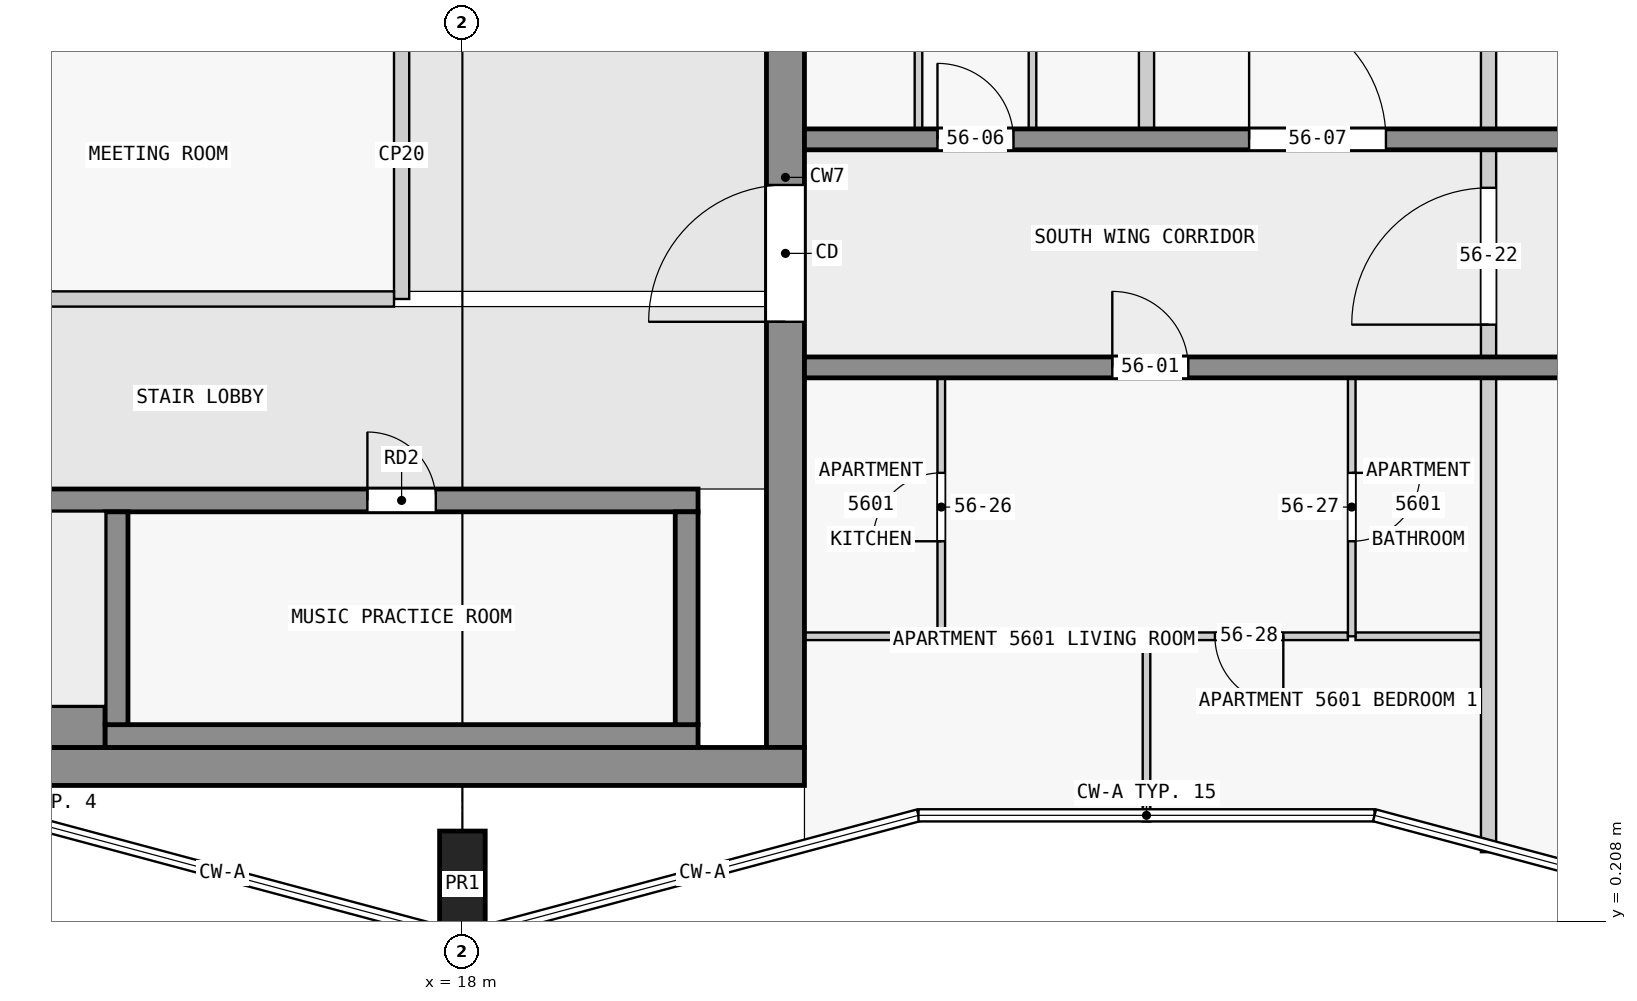
"""IFC4 building model, lengths in metres.
Left out: names, types, materials, properties, quantities, classifications, styles, units other than length and angle.
Written with IfcOpenShell. Run it as: python <this file> out.ifc"""

import sys

from ifc_helpers import new_model, si_unit, direction, frame, frame_2d, origin, origin_2d, place, context, subcontext, project, spatial, rectangle, extrude, element, fill, save


model = new_model("IFC4")
c1 = context("Model", 3, precision=1e-05, world=origin(), true_north=direction((0.0, 1.0)))
c2 = subcontext(c1, "Body", "Model", "MODEL_VIEW")
j1 = project(units=[si_unit("LENGTHUNIT", "METRE"), si_unit("PLANEANGLEUNIT", "RADIAN")], contexts=[c1])
p1 = place(None, origin())
s1 = spatial("IfcSite", under=j1, at=p1, CompositionType="ELEMENT")
p2 = place(p1, origin())
s2 = spatial("IfcBuilding", under=s1, at=p2, CompositionType="ELEMENT")
p3 = place(p2, frame((0.0, 0.0, 215.4)))
s3 = spatial("IfcBuildingStorey", under=s2, at=p3, CompositionType="ELEMENT", Elevation=215.4)
p4 = place(p3, frame((18.0, 0.7, 0.0), z_axis=(0.0, 0.0, 1.0), x_axis=(1.0, 0.0, 0.0)))
e1 = element("IfcColumn", 1, at=p4, inside=s3, PredefinedType="COLUMN", context=c2, shape_type="SweptSolid", body=[
    extrude(rectangle(XDim=0.6, YDim=1.4, at=origin_2d()), origin(), (0.0, 0.0, 1.0), 3.5),
])
p5 = place(p3, frame((1.8, 2.25, 0.0), z_axis=(0.0, 0.0, 1.0), x_axis=(1.0, 0.0, 0.0)))
e2 = element("IfcWall", 2, at=p5, inside=s3, PredefinedType="SHEAR", context=c2, shape_type="SweptSolid", body=[
    extrude(rectangle(XDim=20.7, YDim=0.5, at=frame_2d((10.35, 0.0))), origin(), (0.0, 0.0, 1.0), 3.25),
])
p6 = place(p3, frame((22.25, 2.5, 0.0), z_axis=(0.0, 0.0, 1.0), x_axis=(0.0, 1.0, 0.0)))
e3 = element("IfcWall", 3, at=p6, inside=s3, PredefinedType="SHEAR", context=c2, shape_type="SweptSolid", body=[
    extrude(rectangle(XDim=15.0, YDim=0.5, at=frame_2d((7.5, 0.0))), origin(), (0.0, 0.0, 1.0), 3.25),
])
p7 = place(p6, frame((5.6, 0.0, 0.0)))
e4 = element("IfcOpeningElement", 4, at=p7, cuts=e3, PredefinedType="OPENING", context=c2, shape_type="SweptSolid", body=[
    extrude(rectangle(XDim=1.8, YDim=2.1, at=frame_2d((0.9, 1.05))), frame((0.0, 0.26, 0.0), z_axis=(0.0, -1.0, 0.0), x_axis=(1.0, 0.0, 0.0)), (0.0, 0.0, 1.0), 0.52),
])
p8 = place(p3, frame((6.9, 2.775, 0.0), z_axis=(0.0, 0.0, 1.0), x_axis=(1.0, 0.0, 0.0)))
e5 = element("IfcWall", 5, at=p8, inside=s3, PredefinedType="SHEAR", context=c2, shape_type="SweptSolid", body=[
    extrude(rectangle(XDim=6.4, YDim=0.55, at=frame_2d((3.2, 0.0))), origin(), (0.0, 0.0, 1.0), 3.25),
])
p9 = place(p3, frame((13.3, 2.65, 0.0), z_axis=(0.0, 0.0, 1.0), x_axis=(1.0, 0.0, 0.0)))
e6 = element("IfcWall", 6, at=p9, inside=s3, PredefinedType="SHEAR", context=c2, shape_type="SweptSolid", body=[
    extrude(rectangle(XDim=7.8, YDim=0.3, at=frame_2d((3.9, 0.0))), origin(), (0.0, 0.0, 1.0), 3.25),
])
for number, where, z_axis, x_axis in (
    (7, (13.45, 2.8, 0.0), (0.0, 0.0, 1.0), (0.0, 1.0, 0.0)),
    (8, (20.95, 2.8, 0.0), (0.0, 0.0, 1.0), (0.0, 1.0, 0.0)),
):
    element("IfcWall", number, at=place(p3, frame(where, z_axis=z_axis, x_axis=x_axis)), inside=s3, PredefinedType="SHEAR", context=c2, shape_type="SweptSolid", body=[
        extrude(rectangle(XDim=2.8, YDim=0.3, at=frame_2d((1.4, 0.0))), origin(), (0.0, 0.0, 1.0), 3.25),
    ])
p10 = place(p3, frame((2.3, 5.75, 0.0), z_axis=(0.0, 0.0, 1.0), x_axis=(1.0, 0.0, 0.0)))
e9 = element("IfcWall", 9, at=p10, inside=s3, PredefinedType="SHEAR", context=c2, shape_type="SweptSolid", body=[
    extrude(rectangle(XDim=18.8, YDim=0.3, at=frame_2d((9.4, 0.0))), origin(), (0.0, 0.0, 1.0), 3.25),
])
p11 = place(p10, frame((4.65, 0.0, 0.0)))
e10 = element("IfcOpeningElement", 10, at=p11, cuts=e9, PredefinedType="OPENING", context=c2, shape_type="SweptSolid", body=[
    extrude(rectangle(XDim=1.1, YDim=2.1, at=frame_2d((0.55, 1.05))), frame((0.0, 0.16, 0.0), z_axis=(0.0, -1.0, 0.0), x_axis=(1.0, 0.0, 0.0)), (0.0, 0.0, 1.0), 0.32),
])
p12 = place(p10, frame((0.45, 0.0, 0.0)))
e11 = element("IfcOpeningElement", 11, at=p12, cuts=e9, PredefinedType="OPENING", context=c2, shape_type="SweptSolid", body=[
    extrude(rectangle(XDim=1.1, YDim=2.1, at=frame_2d((0.55, 1.05))), frame((0.0, 0.16, 0.0), z_axis=(0.0, -1.0, 0.0), x_axis=(1.0, 0.0, 0.0)), (0.0, 0.0, 1.0), 0.32),
])
p13 = place(p10, frame((2.75, 0.0, 0.0)))
e12 = element("IfcOpeningElement", 12, at=p13, cuts=e9, PredefinedType="OPENING", context=c2, shape_type="SweptSolid", body=[
    extrude(rectangle(XDim=1.1, YDim=2.1, at=frame_2d((0.55, 1.05))), frame((0.0, 0.16, 0.0), z_axis=(0.0, -1.0, 0.0), x_axis=(1.0, 0.0, 0.0)), (0.0, 0.0, 1.0), 0.32),
])
p14 = place(p10, frame((14.45, 0.0, 0.0)))
e13 = element("IfcOpeningElement", 13, at=p14, cuts=e9, PredefinedType="OPENING", context=c2, shape_type="SweptSolid", body=[
    extrude(rectangle(XDim=0.9, YDim=2.1, at=frame_2d((0.45, 1.05))), frame((0.0, 0.16, 0.0), z_axis=(0.0, -1.0, 0.0), x_axis=(1.0, 0.0, 0.0)), (0.0, 0.0, 1.0), 0.32),
])
p15 = place(p3, frame((22.5, 7.5, 0.0), z_axis=(0.0, 0.0, 1.0), x_axis=(1.0, 0.0, 0.0)))
e14 = element("IfcWall", 14, at=p15, inside=s3, PredefinedType="SHEAR", context=c2, shape_type="SweptSolid", body=[
    extrude(rectangle(XDim=22.5, YDim=0.275, at=frame_2d((11.25, 0.0))), origin(), (0.0, 0.0, 1.0), 3.25),
])
p16 = place(p15, frame((4.05, 0.0, 0.0)))
e15 = element("IfcOpeningElement", 15, at=p16, cuts=e14, PredefinedType="OPENING", context=c2, shape_type="SweptSolid", body=[
    extrude(rectangle(XDim=1.0, YDim=2.1, at=frame_2d((0.5, 1.05))), frame((0.0, 0.147, 0.0), z_axis=(0.0, -1.0, 0.0), x_axis=(1.0, 0.0, 0.0)), (0.0, 0.0, 1.0), 0.295),
])
p17 = place(p15, frame((10.75, 0.0, 0.0)))
e16 = element("IfcOpeningElement", 16, at=p17, cuts=e14, PredefinedType="OPENING", context=c2, shape_type="SweptSolid", body=[
    extrude(rectangle(XDim=1.0, YDim=2.1, at=frame_2d((0.5, 1.05))), frame((0.0, 0.147, 0.0), z_axis=(0.0, -1.0, 0.0), x_axis=(1.0, 0.0, 0.0)), (0.0, 0.0, 1.0), 0.295),
])
p18 = place(p15, frame((15.25, 0.0, 0.0)))
e17 = element("IfcOpeningElement", 17, at=p18, cuts=e14, PredefinedType="OPENING", context=c2, shape_type="SweptSolid", body=[
    extrude(rectangle(XDim=1.0, YDim=2.1, at=frame_2d((0.5, 1.05))), frame((0.0, 0.147, 0.0), z_axis=(0.0, -1.0, 0.0), x_axis=(1.0, 0.0, 0.0)), (0.0, 0.0, 1.0), 0.295),
])
p19 = place(p15, frame((18.75, 0.0, 0.0)))
e18 = element("IfcOpeningElement", 18, at=p19, cuts=e14, PredefinedType="OPENING", context=c2, shape_type="SweptSolid", body=[
    extrude(rectangle(XDim=0.9, YDim=2.1, at=frame_2d((0.45, 1.05))), frame((0.0, 0.147, 0.0), z_axis=(0.0, -1.0, 0.0), x_axis=(1.0, 0.0, 0.0)), (0.0, 0.0, 1.0), 0.295),
])
p20 = place(p15, frame((20.95, 0.0, 0.0)))
e19 = element("IfcOpeningElement", 19, at=p20, cuts=e14, PredefinedType="OPENING", context=c2, shape_type="SweptSolid", body=[
    extrude(rectangle(XDim=1.0, YDim=2.1, at=frame_2d((0.5, 1.05))), frame((0.0, 0.147, 0.0), z_axis=(0.0, -1.0, 0.0), x_axis=(1.0, 0.0, 0.0)), (0.0, 0.0, 1.0), 0.295),
])
p21 = place(p3, frame((22.5, 10.5, 0.0), z_axis=(0.0, 0.0, 1.0), x_axis=(1.0, 0.0, 0.0)))
e20 = element("IfcWall", 20, at=p21, inside=s3, PredefinedType="SHEAR", context=c2, shape_type="SweptSolid", body=[
    extrude(rectangle(XDim=22.5, YDim=0.275, at=frame_2d((11.25, 0.0))), origin(), (0.0, 0.0, 1.0), 3.25),
])
p22 = place(p21, frame((1.75, 0.0, 0.0)))
e21 = element("IfcOpeningElement", 21, at=p22, cuts=e20, PredefinedType="OPENING", context=c2, shape_type="SweptSolid", body=[
    extrude(rectangle(XDim=1.0, YDim=2.1, at=frame_2d((0.5, 1.05))), frame((0.0, 0.147, 0.0), z_axis=(0.0, -1.0, 0.0), x_axis=(1.0, 0.0, 0.0)), (0.0, 0.0, 1.0), 0.295),
])
p23 = place(p21, frame((5.85, 0.0, 0.0)))
e22 = element("IfcOpeningElement", 22, at=p23, cuts=e20, PredefinedType="OPENING", context=c2, shape_type="SweptSolid", body=[
    extrude(rectangle(XDim=1.8, YDim=2.1, at=frame_2d((0.9, 1.05))), frame((0.0, 0.147, 0.0), z_axis=(0.0, -1.0, 0.0), x_axis=(1.0, 0.0, 0.0)), (0.0, 0.0, 1.0), 0.295),
])
p24 = place(p21, frame((10.75, 0.0, 0.0)))
e23 = element("IfcOpeningElement", 23, at=p24, cuts=e20, PredefinedType="OPENING", context=c2, shape_type="SweptSolid", body=[
    extrude(rectangle(XDim=1.0, YDim=2.1, at=frame_2d((0.5, 1.05))), frame((0.0, 0.147, 0.0), z_axis=(0.0, -1.0, 0.0), x_axis=(1.0, 0.0, 0.0)), (0.0, 0.0, 1.0), 0.295),
])
p25 = place(p21, frame((16.85, 0.0, 0.0)))
e24 = element("IfcOpeningElement", 24, at=p25, cuts=e20, PredefinedType="OPENING", context=c2, shape_type="SweptSolid", body=[
    extrude(rectangle(XDim=1.0, YDim=2.1, at=frame_2d((0.5, 1.05))), frame((0.0, 0.147, 0.0), z_axis=(0.0, -1.0, 0.0), x_axis=(1.0, 0.0, 0.0)), (0.0, 0.0, 1.0), 0.295),
])
p26 = place(p3, frame((10.9, 8.4, 0.0), z_axis=(0.0, 0.0, 1.0), x_axis=(1.0, 0.0, 0.0)))
e25 = element("IfcWall", 25, at=p26, inside=s3, PredefinedType="PARTITIONING", context=c2, shape_type="SweptSolid", body=[
    extrude(rectangle(XDim=6.2, YDim=0.2, at=frame_2d((3.1, 0.0))), origin(), (0.0, 0.0, 1.0), 3.25),
])
p27 = place(p3, frame((17.2, 8.4, 0.0), z_axis=(0.0, 0.0, 1.0), x_axis=(0.0, 1.0, 0.0)))
e26 = element("IfcWall", 26, at=p27, inside=s3, PredefinedType="PARTITIONING", context=c2, shape_type="SweptSolid", body=[
    extrude(rectangle(XDim=3.8, YDim=0.2, at=frame_2d((1.9, 0.0))), origin(), (0.0, 0.0, 1.0), 3.25),
])
p28 = place(p3, frame((29.65, 3.962, 0.0), z_axis=(0.0, 0.0, 1.0), x_axis=(-1.0, 0.0, 0.0)))
e27 = element("IfcWall", 27, at=p28, inside=s3, PredefinedType="PARTITIONING", context=c2, shape_type="SweptSolid", body=[
    extrude(rectangle(XDim=2.65, YDim=0.1, at=frame_2d((1.325, 0.0))), origin(), (0.0, 0.0, 1.0), 3.25),
])
p29 = place(p28, frame((0.85, 0.0, 0.0)))
e28 = element("IfcOpeningElement", 28, at=p29, cuts=e27, PredefinedType="OPENING", context=c2, shape_type="SweptSolid", body=[
    extrude(rectangle(XDim=0.9, YDim=2.1, at=frame_2d((0.45, 1.05))), frame((0.0, 0.06, 0.0), z_axis=(0.0, -1.0, 0.0), x_axis=(1.0, 0.0, 0.0)), (0.0, 0.0, 1.0), 0.12),
])
p30 = place(p3, frame((22.5, 3.962, 0.0), z_axis=(0.0, 0.0, 1.0), x_axis=(1.0, 0.0, 0.0)))
e29 = element("IfcWall", 29, at=p30, inside=s3, PredefinedType="PARTITIONING", context=c2, shape_type="SweptSolid", body=[
    extrude(rectangle(XDim=1.75, YDim=0.1, at=frame_2d((0.875, 0.0))), origin(), (0.0, 0.0, 1.0), 3.25),
])
p31 = place(p3, frame((29.75, 3.962, 0.0), z_axis=(0.0, 0.0, 1.0), x_axis=(1.0, 0.0, 0.0)))
e30 = element("IfcWall", 30, at=p31, inside=s3, PredefinedType="PARTITIONING", context=c2, shape_type="SweptSolid", body=[
    extrude(rectangle(XDim=1.65, YDim=0.1, at=frame_2d((0.825, 0.0))), origin(), (0.0, 0.0, 1.0), 3.25),
])
p32 = place(p3, frame((24.0, 10.637, 0.0), z_axis=(0.0, 0.0, 1.0), x_axis=(0.0, 1.0, 0.0)))
e31 = element("IfcWall", 31, at=p32, inside=s3, PredefinedType="PARTITIONING", context=c2, shape_type="SweptSolid", body=[
    extrude(rectangle(XDim=3.4, YDim=0.1, at=frame_2d((1.7, 0.0))), origin(), (0.0, 0.0, 1.0), 3.25),
])
p33 = place(p32, frame((1.25, 0.0, 0.0)))
e32 = element("IfcOpeningElement", 32, at=p33, cuts=e31, PredefinedType="OPENING", context=c2, shape_type="SweptSolid", body=[
    extrude(rectangle(XDim=0.9, YDim=2.1, at=frame_2d((0.45, 1.05))), frame((0.0, 0.06, 0.0), z_axis=(0.0, -1.0, 0.0), x_axis=(1.0, 0.0, 0.0)), (0.0, 0.0, 1.0), 0.12),
])
p34 = place(p3, frame((24.3, 3.962, 0.0), z_axis=(0.0, 0.0, 1.0), x_axis=(0.0, 1.0, 0.0)))
e33 = element("IfcWall", 33, at=p34, inside=s3, PredefinedType="PARTITIONING", context=c2, shape_type="SweptSolid", body=[
    extrude(rectangle(XDim=3.4, YDim=0.1, at=frame_2d((1.7, 0.0))), origin(), (0.0, 0.0, 1.0), 3.25),
])
p35 = place(p34, frame((1.25, 0.0, 0.0)))
e34 = element("IfcOpeningElement", 34, at=p35, cuts=e33, PredefinedType="OPENING", context=c2, shape_type="SweptSolid", body=[
    extrude(rectangle(XDim=0.9, YDim=2.1, at=frame_2d((0.45, 1.05))), frame((0.0, 0.06, 0.0), z_axis=(0.0, -1.0, 0.0), x_axis=(1.0, 0.0, 0.0)), (0.0, 0.0, 1.0), 0.12),
])
p36 = place(p3, frame((25.5, 14.038, 0.0), z_axis=(0.0, 0.0, 1.0), x_axis=(0.0, -1.0, 0.0)))
e35 = element("IfcWall", 35, at=p36, inside=s3, PredefinedType="PARTITIONING", context=c2, shape_type="SweptSolid", body=[
    extrude(rectangle(XDim=3.4, YDim=0.1, at=frame_2d((1.7, 0.0))), origin(), (0.0, 0.0, 1.0), 3.25),
])
p37 = place(p36, frame((1.25, 0.0, 0.0)))
e36 = element("IfcOpeningElement", 36, at=p37, cuts=e35, PredefinedType="OPENING", context=c2, shape_type="SweptSolid", body=[
    extrude(rectangle(XDim=0.9, YDim=2.1, at=frame_2d((0.45, 1.05))), frame((0.0, 0.06, 0.0), z_axis=(0.0, -1.0, 0.0), x_axis=(1.0, 0.0, 0.0)), (0.0, 0.0, 1.0), 0.12),
])
p38 = place(p3, frame((27.0, 3.913, 0.0), z_axis=(0.0, 0.0, 1.0), x_axis=(0.0, -1.0, 0.0)))
e37 = element("IfcWall", 37, at=p38, inside=s3, PredefinedType="PARTITIONING", context=c2, shape_type="SweptSolid", body=[
    extrude(rectangle(XDim=2.386, YDim=0.1, at=frame_2d((1.193, 0.0))), origin(), (0.0, 0.0, 1.0), 3.25),
])
p39 = place(p3, frame((27.0, 10.637, 0.0), z_axis=(0.0, 0.0, 1.0), x_axis=(0.0, 1.0, 0.0)))
e38 = element("IfcWall", 38, at=p39, inside=s3, PredefinedType="PARTITIONING", context=c2, shape_type="SweptSolid", body=[
    extrude(rectangle(XDim=3.4, YDim=0.2, at=frame_2d((1.7, 0.0))), origin(), (0.0, 0.0, 1.0), 3.25),
])
p40 = place(p3, frame((29.7, 7.363, 0.0), z_axis=(0.0, 0.0, 1.0), x_axis=(0.0, -1.0, 0.0)))
e39 = element("IfcWall", 39, at=p40, inside=s3, PredefinedType="PARTITIONING", context=c2, shape_type="SweptSolid", body=[
    extrude(rectangle(XDim=3.4, YDim=0.1, at=frame_2d((1.7, 0.0))), origin(), (0.0, 0.0, 1.0), 3.25),
])
p41 = place(p40, frame((1.25, 0.0, 0.0)))
e40 = element("IfcOpeningElement", 40, at=p41, cuts=e39, PredefinedType="OPENING", context=c2, shape_type="SweptSolid", body=[
    extrude(rectangle(XDim=0.9, YDim=2.1, at=frame_2d((0.45, 1.05))), frame((0.0, 0.06, 0.0), z_axis=(0.0, -1.0, 0.0), x_axis=(1.0, 0.0, 0.0)), (0.0, 0.0, 1.0), 0.12),
])
for number, where, z_axis, x_axis in (
    (41, (31.5, 1.122, 0.0), (0.0, 0.0, 1.0), (0.0, 1.0, 0.0)),
    (42, (31.5, 10.637, 0.0), (0.0, 0.0, 1.0), (0.0, 1.0, 0.0)),
):
    element("IfcWall", number, at=place(p3, frame(where, z_axis=z_axis, x_axis=x_axis)), inside=s3, PredefinedType="PARTITIONING", context=c2, shape_type="SweptSolid", body=[
        extrude(rectangle(XDim=6.24, YDim=0.2, at=frame_2d((3.12, 0.0))), origin(), (0.0, 0.0, 1.0), 3.25),
    ])
p42 = place(p3, frame((31.5, 7.462, 0.0), z_axis=(0.0, 0.0, 1.0), x_axis=(0.0, 1.0, 0.0)))
e43 = element("IfcWall", 43, at=p42, inside=s3, PredefinedType="PARTITIONING", context=c2, shape_type="SweptSolid", body=[
    extrude(rectangle(XDim=3.075, YDim=0.2, at=frame_2d((1.538, 0.0))), origin(), (0.0, 0.0, 1.0), 3.25),
])
p43 = place(p42, frame((0.6, 0.0, 0.0)))
e44 = element("IfcOpeningElement", 44, at=p43, cuts=e43, PredefinedType="OPENING", context=c2, shape_type="SweptSolid", body=[
    extrude(rectangle(XDim=1.8, YDim=2.1, at=frame_2d((0.9, 1.05))), frame((0.0, 0.11, 0.0), z_axis=(0.0, -1.0, 0.0), x_axis=(1.0, 0.0, 0.0)), (0.0, 0.0, 1.0), 0.22),
])
p44 = place(p7, origin())
e45 = element("IfcDoor", 45, at=p44, inside=s3, OperationType="DOUBLE_DOOR_SINGLE_SWING", PredefinedType="DOOR", context=c2, shape_type="SweptSolid", body=[
    extrude(rectangle(XDim=1.8, YDim=2.1, at=frame_2d((0.9, 1.05))), frame((0.0, 0.025, 0.0), z_axis=(0.0, -1.0, 0.0), x_axis=(1.0, 0.0, 0.0)), (0.0, 0.0, 1.0), 0.05),
])
fill(e4, e45)
p45 = place(p14, origin())
e46 = element("IfcDoor", 46, at=p45, inside=s3, OperationType="SINGLE_SWING_LEFT", PredefinedType="DOOR", context=c2, shape_type="SweptSolid", body=[
    extrude(rectangle(XDim=0.9, YDim=2.1, at=frame_2d((0.45, 1.05))), frame((0.0, 0.025, 0.0), z_axis=(0.0, -1.0, 0.0), x_axis=(1.0, 0.0, 0.0)), (0.0, 0.0, 1.0), 0.05),
])
fill(e13, e46)
p46 = place(p16, origin())
e47 = element("IfcDoor", 47, at=p46, inside=s3, OperationType="SINGLE_SWING_LEFT", PredefinedType="DOOR", context=c2, shape_type="SweptSolid", body=[
    extrude(rectangle(XDim=1.0, YDim=2.1, at=frame_2d((0.5, 1.05))), frame((0.0, 0.025, 0.0), z_axis=(0.0, -1.0, 0.0), x_axis=(1.0, 0.0, 0.0)), (0.0, 0.0, 1.0), 0.05),
])
fill(e15, e47)
p47 = place(p22, origin())
e48 = element("IfcDoor", 48, at=p47, inside=s3, OperationType="SINGLE_SWING_LEFT", PredefinedType="DOOR", context=c2, shape_type="SweptSolid", body=[
    extrude(rectangle(XDim=1.0, YDim=2.1, at=frame_2d((0.5, 1.05))), frame((0.0, 0.025, 0.0), z_axis=(0.0, -1.0, 0.0), x_axis=(1.0, 0.0, 0.0)), (0.0, 0.0, 1.0), 0.05),
])
fill(e21, e48)
p48 = place(p23, origin())
e49 = element("IfcDoor", 49, at=p48, inside=s3, OperationType="SINGLE_SWING_LEFT", PredefinedType="DOOR", context=c2, shape_type="SweptSolid", body=[
    extrude(rectangle(XDim=1.8, YDim=2.1, at=frame_2d((0.9, 1.05))), frame((0.0, 0.025, 0.0), z_axis=(0.0, -1.0, 0.0), x_axis=(1.0, 0.0, 0.0)), (0.0, 0.0, 1.0), 0.05),
])
fill(e22, e49)
p49 = place(p43, origin())
e50 = element("IfcDoor", 50, at=p49, inside=s3, OperationType="SINGLE_SWING_LEFT", PredefinedType="DOOR", context=c2, shape_type="SweptSolid", body=[
    extrude(rectangle(XDim=1.8, YDim=2.1, at=frame_2d((0.9, 1.05))), frame((0.0, 0.025, 0.0), z_axis=(0.0, -1.0, 0.0), x_axis=(1.0, 0.0, 0.0)), (0.0, 0.0, 1.0), 0.05),
])
fill(e44, e50)
p50 = place(p35, origin())
e51 = element("IfcDoor", 51, at=p50, inside=s3, OperationType="SINGLE_SWING_LEFT", PredefinedType="DOOR", context=c2, shape_type="SweptSolid", body=[
    extrude(rectangle(XDim=0.9, YDim=2.1, at=frame_2d((0.45, 1.05))), frame((0.0, 0.025, 0.0), z_axis=(0.0, -1.0, 0.0), x_axis=(1.0, 0.0, 0.0)), (0.0, 0.0, 1.0), 0.05),
])
fill(e34, e51)
p51 = place(p41, origin())
e52 = element("IfcDoor", 52, at=p51, inside=s3, OperationType="SINGLE_SWING_LEFT", PredefinedType="DOOR", context=c2, shape_type="SweptSolid", body=[
    extrude(rectangle(XDim=0.9, YDim=2.1, at=frame_2d((0.45, 1.05))), frame((0.0, 0.025, 0.0), z_axis=(0.0, -1.0, 0.0), x_axis=(1.0, 0.0, 0.0)), (0.0, 0.0, 1.0), 0.05),
])
fill(e40, e52)
p52 = place(p29, origin())
e53 = element("IfcDoor", 53, at=p52, inside=s3, OperationType="SINGLE_SWING_LEFT", PredefinedType="DOOR", context=c2, shape_type="SweptSolid", body=[
    extrude(rectangle(XDim=0.9, YDim=2.1, at=frame_2d((0.45, 1.05))), frame((0.0, 0.025, 0.0), z_axis=(0.0, -1.0, 0.0), x_axis=(1.0, 0.0, 0.0)), (0.0, 0.0, 1.0), 0.05),
])
fill(e28, e53)
save(model, sys.argv[1])
